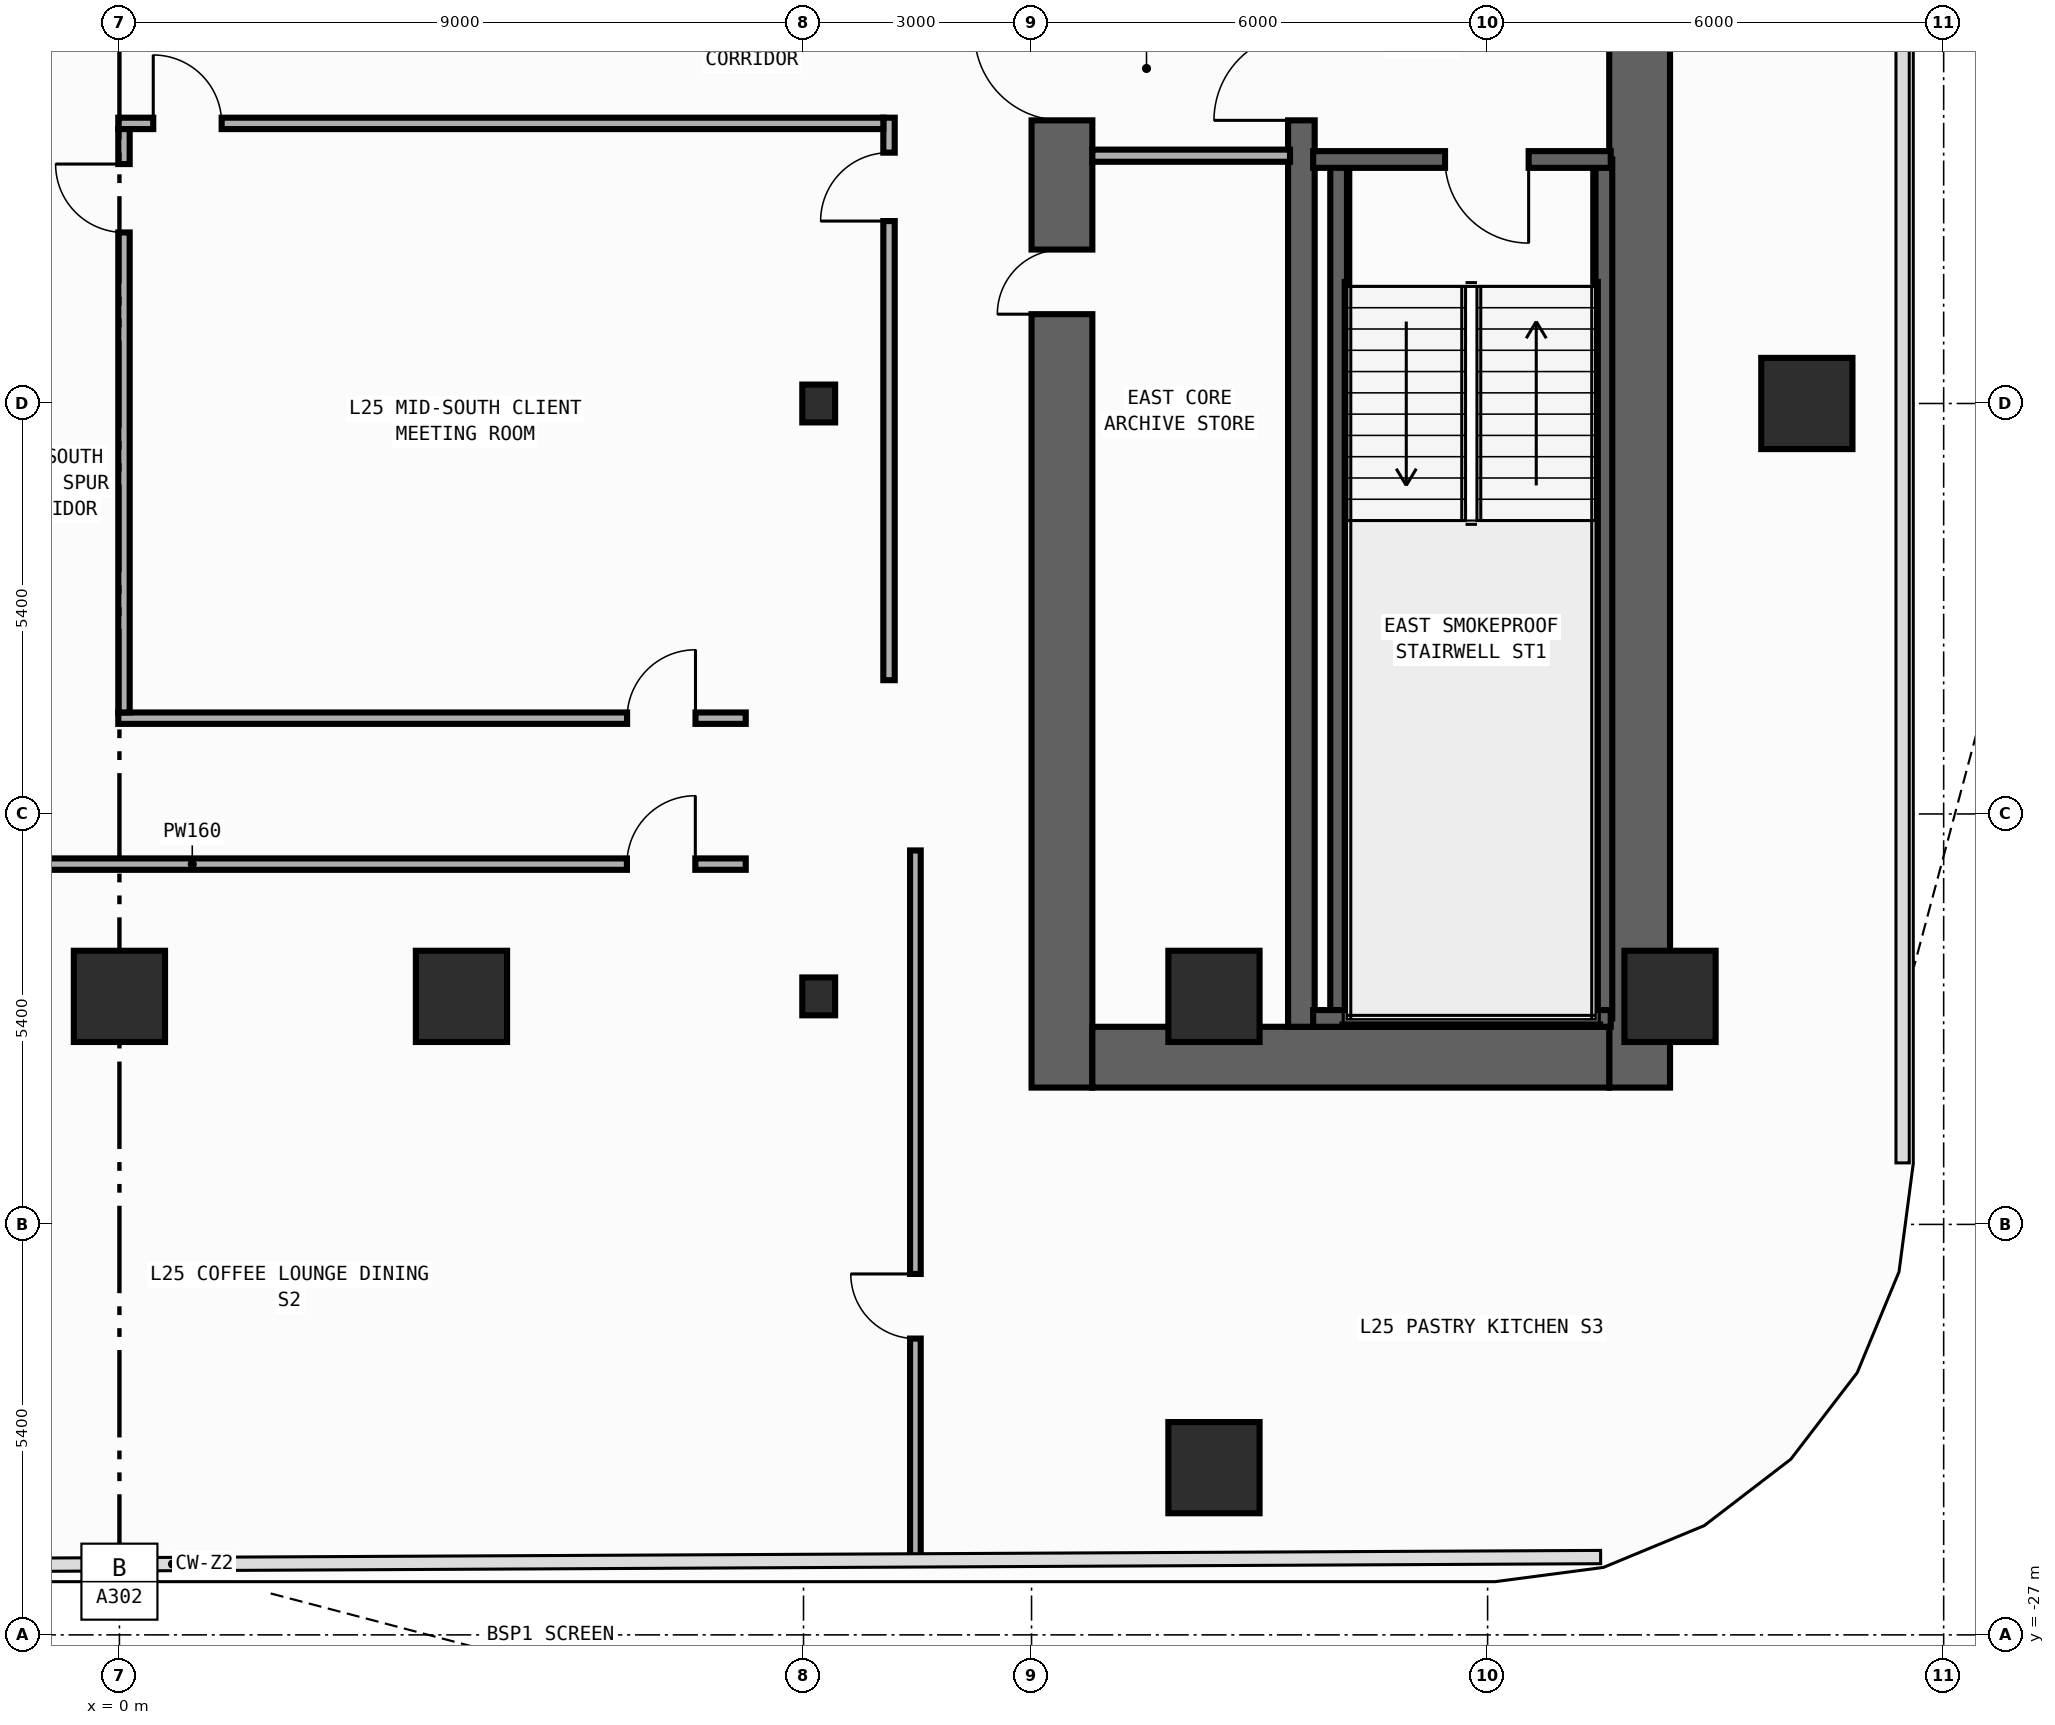
"""IFC4 building model, lengths in metres.
Left out: names, types, materials, properties, quantities, classifications, styles, units other than length and angle.
Written with IfcOpenShell. Run it as: python <this file> out.ifc"""

import sys

from ifc_helpers import new_model, si_unit, direction, frame, frame_2d, origin, origin_2d, place, context, subcontext, project, spatial, rectangle, i_section, extrude, element, fill, save


model = new_model("IFC4")
c1 = context("Model", 3, precision=1e-05, world=origin(), true_north=direction((0.0, 1.0)))
c2 = subcontext(c1, "Body", "Model", "MODEL_VIEW")
j1 = project(units=[si_unit("LENGTHUNIT", "METRE"), si_unit("PLANEANGLEUNIT", "RADIAN")], contexts=[c1])
p1 = place(None, origin())
s1 = spatial("IfcSite", under=j1, at=p1, CompositionType="ELEMENT")
p2 = place(p1, origin())
s2 = spatial("IfcBuilding", under=s1, at=p2, CompositionType="ELEMENT")
p3 = place(p2, frame((0.0, 0.0, 110.0)))
s3 = spatial("IfcBuildingStorey", under=s2, at=p3, CompositionType="ELEMENT", Elevation=110.0)
p4 = place(p3, frame((12.4, -19.8, 0.0), z_axis=(0.0, 0.0, 1.0), x_axis=(0.0, 1.0, 0.0)))
e1 = element("IfcWall", 1, at=p4, inside=s3, PredefinedType="SHEAR", context=c2, shape_type="SweptSolid", body=[
    extrude(rectangle(XDim=27.0, YDim=0.8, at=frame_2d((13.5, 0.0))), origin(), (0.0, 0.0, 1.0), 3.94),
])
p5 = place(p4, frame((23.05, 0.0, 0.0)))
e2 = element("IfcOpeningElement", 2, at=p5, cuts=e1, PredefinedType="OPENING", context=c2, shape_type="SweptSolid", body=[
    extrude(rectangle(XDim=1.1, YDim=2.2, at=frame_2d((0.55, 1.1))), frame((0.0, 0.41, 0.0), z_axis=(0.0, -1.0, 0.0), x_axis=(1.0, 0.0, 0.0)), (0.0, 0.0, 1.0), 0.82),
])
p6 = place(p4, frame((19.85, 0.0, 0.0)))
e3 = element("IfcOpeningElement", 3, at=p6, cuts=e1, PredefinedType="OPENING", context=c2, shape_type="SweptSolid", body=[
    extrude(rectangle(XDim=1.1, YDim=2.2, at=frame_2d((0.55, 1.1))), frame((0.0, 0.41, 0.0), z_axis=(0.0, -1.0, 0.0), x_axis=(1.0, 0.0, 0.0)), (0.0, 0.0, 1.0), 0.82),
])
p7 = place(p4, frame((16.65, 0.0, 0.0)))
e4 = element("IfcOpeningElement", 4, at=p7, cuts=e1, PredefinedType="OPENING", context=c2, shape_type="SweptSolid", body=[
    extrude(rectangle(XDim=1.1, YDim=2.2, at=frame_2d((0.55, 1.1))), frame((0.0, 0.41, 0.0), z_axis=(0.0, -1.0, 0.0), x_axis=(1.0, 0.0, 0.0)), (0.0, 0.0, 1.0), 0.82),
])
p8 = place(p4, frame((10.175, 0.0, 0.0)))
e5 = element("IfcOpeningElement", 5, at=p8, cuts=e1, PredefinedType="OPENING", context=c2, shape_type="SweptSolid", body=[
    extrude(rectangle(XDim=0.85, YDim=2.1, at=frame_2d((0.425, 1.05))), frame((0.0, 0.41, 0.0), z_axis=(0.0, -1.0, 0.0), x_axis=(1.0, 0.0, 0.0)), (0.0, 0.0, 1.0), 0.82),
])
p9 = place(p4, frame((12.725, 0.0, 0.0)))
e6 = element("IfcOpeningElement", 6, at=p9, cuts=e1, PredefinedType="OPENING", context=c2, shape_type="SweptSolid", body=[
    extrude(rectangle(XDim=1.15, YDim=2.2, at=frame_2d((0.575, 1.1))), frame((0.0, 0.41, 0.0), z_axis=(0.0, -1.0, 0.0), x_axis=(1.0, 0.0, 0.0)), (0.0, 0.0, 1.0), 0.82),
])
p10 = place(p4, frame((25.125, 0.0, 0.0)))
e7 = element("IfcOpeningElement", 7, at=p10, cuts=e1, PredefinedType="OPENING", context=c2, shape_type="SweptSolid", body=[
    extrude(rectangle(XDim=0.85, YDim=2.1, at=frame_2d((0.425, 1.05))), frame((0.0, 0.41, 0.0), z_axis=(0.0, -1.0, 0.0), x_axis=(1.0, 0.0, 0.0)), (0.0, 0.0, 1.0), 0.82),
])
p11 = place(p3, frame((20.0, -19.8, 0.0), z_axis=(0.0, 0.0, 1.0), x_axis=(0.0, 1.0, 0.0)))
e8 = element("IfcWall", 8, at=p11, inside=s3, PredefinedType="SHEAR", context=c2, shape_type="SweptSolid", body=[
    extrude(rectangle(XDim=27.0, YDim=0.8, at=frame_2d((13.5, 0.0))), origin(), (0.0, 0.0, 1.0), 3.94),
])
p12 = place(p3, frame((12.8, -19.4, 0.0), z_axis=(0.0, 0.0, 1.0), x_axis=(1.0, 0.0, 0.0)))
e9 = element("IfcWall", 9, at=p12, inside=s3, PredefinedType="SHEAR", context=c2, shape_type="SweptSolid", body=[
    extrude(rectangle(XDim=6.8, YDim=0.8, at=frame_2d((3.4, 0.0))), origin(), (0.0, 0.0, 1.0), 3.94),
])
p13 = place(p3, frame((15.55, -19.0, 0.0), z_axis=(0.0, 0.0, 1.0), x_axis=(0.0, 1.0, 0.0)))
e10 = element("IfcWall", 10, at=p13, inside=s3, PredefinedType="SHEAR", context=c2, shape_type="SweptSolid", body=[
    extrude(rectangle(XDim=25.4, YDim=0.35, at=frame_2d((12.7, 0.0))), origin(), (0.0, 0.0, 1.0), 3.94),
])
p14 = place(p13, frame((11.925, 0.0, 0.0)))
e11 = element("IfcOpeningElement", 11, at=p14, cuts=e10, PredefinedType="OPENING", context=c2, shape_type="SweptSolid", body=[
    extrude(rectangle(XDim=1.15, YDim=2.2, at=frame_2d((0.575, 1.1))), frame((0.0, 0.185, 0.0), z_axis=(0.0, -1.0, 0.0), x_axis=(1.0, 0.0, 0.0)), (0.0, 0.0, 1.0), 0.37),
])
p15 = place(p13, frame((24.325, 0.0, 0.0)))
e12 = element("IfcOpeningElement", 12, at=p15, cuts=e10, PredefinedType="OPENING", context=c2, shape_type="SweptSolid", body=[
    extrude(rectangle(XDim=0.85, YDim=2.1, at=frame_2d((0.425, 1.05))), frame((0.0, 0.185, 0.0), z_axis=(0.0, -1.0, 0.0), x_axis=(1.0, 0.0, 0.0)), (0.0, 0.0, 1.0), 0.37),
])
for number, where, z_axis, x_axis in (
    (13, (16.04, -18.89, 0.0), (0.0, 0.0, 1.0), (0.0, 1.0, 0.0)),
    (14, (19.53, -18.89, 0.0), (0.0, 0.0, 1.0), (0.0, 1.0, 0.0)),
):
    element("IfcWall", number, at=place(p3, frame(where, z_axis=z_axis, x_axis=x_axis)), inside=s3, PredefinedType="SHEAR", context=c2, shape_type="SweptSolid", body=[
        extrude(rectangle(XDim=11.3, YDim=0.22, at=frame_2d((5.65, 0.0))), origin(), (0.0, 0.0, 1.0), 3.94),
    ])
p16 = place(p3, frame((15.705, -18.89, 0.0), z_axis=(0.0, 0.0, 1.0), x_axis=(1.0, 0.0, 0.0)))
e15 = element("IfcWall", 15, at=p16, inside=s3, PredefinedType="SHEAR", context=c2, shape_type="SweptSolid", body=[
    extrude(rectangle(XDim=3.915, YDim=0.22, at=frame_2d((1.958, 0.0))), origin(), (0.0, 0.0, 1.0), 3.94),
])
p17 = place(p3, frame((19.62, -7.59, 0.0), z_axis=(0.0, 0.0, 1.0), x_axis=(-1.0, 0.0, 0.0)))
e16 = element("IfcWall", 16, at=p17, inside=s3, PredefinedType="SHEAR", context=c2, shape_type="SweptSolid", body=[
    extrude(rectangle(XDim=3.915, YDim=0.22, at=frame_2d((1.958, 0.0))), origin(), (0.0, 0.0, 1.0), 3.94),
])
p18 = place(p17, frame((1.08, 0.0, 0.0)))
e17 = element("IfcOpeningElement", 17, at=p18, cuts=e16, PredefinedType="OPENING", context=c2, shape_type="SweptSolid", body=[
    extrude(rectangle(XDim=1.1, YDim=2.2, at=frame_2d((0.55, 1.1))), frame((0.0, 0.12, 0.0), z_axis=(0.0, -1.0, 0.0), x_axis=(1.0, 0.0, 0.0)), (0.0, 0.0, 1.0), 0.24),
])
for number, where, z_axis, x_axis in (
    (18, (9.2, -18.6, 0.0), (0.0, 0.0, 1.0), (1.0, 0.0, 0.0)),
    (19, (9.2, -10.8, 0.0), (0.0, 0.0, 1.0), (1.0, 0.0, 0.0)),
):
    element("IfcColumn", number, at=place(p3, frame(where, z_axis=z_axis, x_axis=x_axis)), inside=s3, PredefinedType="COLUMN", context=c2, shape_type="SweptSolid", body=[
        extrude(i_section(OverallWidth=0.432, OverallDepth=0.498, WebThickness=0.045, FlangeThickness=0.07, FilletRadius=0.022, at=origin_2d()), origin(), (0.0, 0.0, 1.0), 4.2),
    ])
for number, where, z_axis, x_axis in (
    (20, (20.4, -18.6, 0.0), (0.0, 0.0, 1.0), (1.0, 0.0, 0.0)),
    (21, (14.4, -18.6, 0.0), (0.0, 0.0, 1.0), (1.0, 0.0, 0.0)),
    (22, (0.0, -18.6, 0.0), (0.0, 0.0, 1.0), (1.0, 0.0, 0.0)),
    (23, (4.5, -18.6, 0.0), (0.0, 0.0, 1.0), (1.0, 0.0, 0.0)),
    (24, (22.2, -10.8, 0.0), (0.0, 0.0, 1.0), (1.0, 0.0, 0.0)),
    (25, (14.4, -24.8, 0.0), (0.0, 0.0, 1.0), (1.0, 0.0, 0.0)),
):
    element("IfcColumn", number, at=place(p3, frame(where, z_axis=z_axis, x_axis=x_axis)), inside=s3, PredefinedType="COLUMN", context=c2, shape_type="SweptSolid", body=[
        extrude(rectangle(XDim=1.2, YDim=1.2, at=origin_2d()), origin(), (0.0, 0.0, 1.0), 4.2),
    ])
p19 = place(p3, frame((12.8, -7.54, 0.0), z_axis=(0.0, 0.0, 1.0), x_axis=(1.0, 0.0, 0.0)))
e26 = element("IfcWall", 26, at=p19, inside=s3, PredefinedType="STANDARD", context=c2, shape_type="SweptSolid", body=[
    extrude(rectangle(XDim=2.6, YDim=0.16, at=frame_2d((1.3, 0.0))), origin(), (0.0, 0.0, 1.0), 3.94),
])
p20 = place(p3, frame((10.125, -14.44, 0.0), z_axis=(0.0, 0.0, 1.0), x_axis=(0.0, 1.0, 0.0)))
e27 = element("IfcWall", 27, at=p20, inside=s3, PredefinedType="PARTITIONING", context=c2, shape_type="SweptSolid", body=[
    extrude(rectangle(XDim=7.4, YDim=0.15, at=frame_2d((3.7, 0.0))), origin(), (0.0, 0.0, 1.0), 3.94),
])
p21 = place(p20, frame((6.04, 0.0, 0.0)))
e28 = element("IfcOpeningElement", 28, at=p21, cuts=e27, PredefinedType="OPENING", context=c2, shape_type="SweptSolid", body=[
    extrude(rectangle(XDim=0.9, YDim=2.15, at=frame_2d((0.45, 1.075))), frame((0.0, 0.085, 0.0), z_axis=(0.0, -1.0, 0.0), x_axis=(1.0, 0.0, 0.0)), (0.0, 0.0, 1.0), 0.17),
])
p22 = place(p3, frame((-0.015, -7.115, 0.0), z_axis=(0.0, 0.0, 1.0), x_axis=(1.0, 0.0, 0.0)))
e29 = element("IfcWall", 29, at=p22, inside=s3, PredefinedType="PARTITIONING", context=c2, shape_type="SweptSolid", body=[
    extrude(rectangle(XDim=10.065, YDim=0.15, at=frame_2d((5.032, 0.0))), origin(), (0.0, 0.0, 1.0), 3.94),
])
p23 = place(p22, frame((0.46, 0.0, 0.0)))
e30 = element("IfcOpeningElement", 30, at=p23, cuts=e29, PredefinedType="OPENING", context=c2, shape_type="SweptSolid", body=[
    extrude(rectangle(XDim=0.9, YDim=2.15, at=frame_2d((0.45, 1.075))), frame((0.0, 0.085, 0.0), z_axis=(0.0, -1.0, 0.0), x_axis=(1.0, 0.0, 0.0)), (0.0, 0.0, 1.0), 0.17),
])
p24 = place(p3, frame((-4.76, -16.86, 0.0), z_axis=(0.0, 0.0, 1.0), x_axis=(1.0, 0.0, 0.0)))
e31 = element("IfcWall", 31, at=p24, inside=s3, PredefinedType="PARTITIONING", context=c2, shape_type="SweptSolid", body=[
    extrude(rectangle(XDim=13.0, YDim=0.15, at=frame_2d((6.5, 0.0))), origin(), (0.0, 0.0, 1.0), 3.94),
])
p25 = place(p24, frame((11.437, 0.0, 0.0)))
e32 = element("IfcOpeningElement", 32, at=p25, cuts=e31, PredefinedType="OPENING", context=c2, shape_type="SweptSolid", body=[
    extrude(rectangle(XDim=0.9, YDim=2.15, at=frame_2d((0.45, 1.075))), frame((0.0, 0.085, 0.0), z_axis=(0.0, -1.0, 0.0), x_axis=(1.0, 0.0, 0.0)), (0.0, 0.0, 1.0), 0.17),
])
p26 = place(p3, frame((-0.015, -14.94, 0.0), z_axis=(0.0, 0.0, 1.0), x_axis=(1.0, 0.0, 0.0)))
e33 = element("IfcWall", 33, at=p26, inside=s3, PredefinedType="PARTITIONING", context=c2, shape_type="SweptSolid", body=[
    extrude(rectangle(XDim=8.255, YDim=0.15, at=frame_2d((4.127, 0.0))), origin(), (0.0, 0.0, 1.0), 3.94),
])
p27 = place(p26, frame((6.694, 0.0, 0.0)))
e34 = element("IfcOpeningElement", 34, at=p27, cuts=e33, PredefinedType="OPENING", context=c2, shape_type="SweptSolid", body=[
    extrude(rectangle(XDim=0.9, YDim=2.15, at=frame_2d((0.45, 1.075))), frame((0.0, 0.085, 0.0), z_axis=(0.0, -1.0, 0.0), x_axis=(1.0, 0.0, 0.0)), (0.0, 0.0, 1.0), 0.17),
])
p28 = place(p3, frame((0.06, -14.865, 0.0), z_axis=(0.0, 0.0, 1.0), x_axis=(0.0, 1.0, 0.0)))
e35 = element("IfcWall", 35, at=p28, inside=s3, PredefinedType="PARTITIONING", context=c2, shape_type="SweptSolid", body=[
    extrude(rectangle(XDim=7.675, YDim=0.15, at=frame_2d((3.837, 0.0))), origin(), (0.0, 0.0, 1.0), 3.94),
])
p29 = place(p28, frame((6.315, 0.0, 0.0)))
e36 = element("IfcOpeningElement", 36, at=p29, cuts=e35, PredefinedType="OPENING", context=c2, shape_type="SweptSolid", body=[
    extrude(rectangle(XDim=0.9, YDim=2.15, at=frame_2d((0.45, 1.075))), frame((0.0, 0.085, 0.0), z_axis=(0.0, -1.0, 0.0), x_axis=(1.0, 0.0, 0.0)), (0.0, 0.0, 1.0), 0.17),
])
p30 = place(p3, frame((10.472, -26.015, 0.0), z_axis=(0.0, 0.0, 1.0), x_axis=(0.0, 1.0, 0.0)))
e37 = element("IfcWall", 37, at=p30, inside=s3, PredefinedType="PARTITIONING", context=c2, shape_type="SweptSolid", body=[
    extrude(rectangle(XDim=9.335, YDim=0.14, at=frame_2d((4.668, 0.0))), origin(), (0.0, 0.0, 1.0), 3.94),
])
p31 = place(p30, frame((2.914, 0.0, 0.0)))
e38 = element("IfcOpeningElement", 38, at=p31, cuts=e37, PredefinedType="OPENING", context=c2, shape_type="SweptSolid", body=[
    extrude(rectangle(XDim=0.85, YDim=2.1, at=frame_2d((0.425, 1.05))), frame((0.0, 0.08, 0.0), z_axis=(0.0, -1.0, 0.0), x_axis=(1.0, 0.0, 0.0)), (0.0, 0.0, 1.0), 0.16),
])
p32 = place(p18, origin())
e39 = element("IfcDoor", 39, at=p32, inside=s3, OperationType="SINGLE_SWING_LEFT", PredefinedType="DOOR", context=c2, shape_type="SweptSolid", body=[
    extrude(rectangle(XDim=1.1, YDim=2.2, at=frame_2d((0.55, 1.1))), frame((0.0, 0.025, 0.0), z_axis=(0.0, -1.0, 0.0), x_axis=(1.0, 0.0, 0.0)), (0.0, 0.0, 1.0), 0.05),
])
fill(e17, e39)
p33 = place(p8, origin())
e40 = element("IfcDoor", 40, at=p33, inside=s3, OperationType="SINGLE_SWING_LEFT", PredefinedType="DOOR", context=c2, shape_type="SweptSolid", body=[
    extrude(rectangle(XDim=0.85, YDim=2.1, at=frame_2d((0.425, 1.05))), frame((0.0, 0.025, 0.0), z_axis=(0.0, -1.0, 0.0), x_axis=(1.0, 0.0, 0.0)), (0.0, 0.0, 1.0), 0.05),
])
fill(e5, e40)
p34 = place(p9, origin())
e41 = element("IfcDoor", 41, at=p34, inside=s3, OperationType="SINGLE_SWING_RIGHT", PredefinedType="DOOR", context=c2, shape_type="SweptSolid", body=[
    extrude(rectangle(XDim=1.15, YDim=2.2, at=frame_2d((0.575, 1.1))), frame((0.0, 0.025, 0.0), z_axis=(0.0, -1.0, 0.0), x_axis=(1.0, 0.0, 0.0)), (0.0, 0.0, 1.0), 0.05),
])
fill(e6, e41)
p35 = place(p14, origin())
e42 = element("IfcDoor", 42, at=p35, inside=s3, OperationType="SINGLE_SWING_LEFT", PredefinedType="DOOR", context=c2, shape_type="SweptSolid", body=[
    extrude(rectangle(XDim=1.15, YDim=2.2, at=frame_2d((0.575, 1.1))), frame((0.0, 0.025, 0.0), z_axis=(0.0, -1.0, 0.0), x_axis=(1.0, 0.0, 0.0)), (0.0, 0.0, 1.0), 0.05),
])
fill(e11, e42)
p36 = place(p21, origin())
e43 = element("IfcDoor", 43, at=p36, inside=s3, OperationType="SINGLE_SWING_LEFT", PredefinedType="DOOR", context=c2, shape_type="SweptSolid", body=[
    extrude(rectangle(XDim=0.9, YDim=2.15, at=frame_2d((0.45, 1.075))), frame((0.0, 0.025, 0.0), z_axis=(0.0, -1.0, 0.0), x_axis=(1.0, 0.0, 0.0)), (0.0, 0.0, 1.0), 0.05),
])
fill(e28, e43)
p37 = place(p23, origin())
e44 = element("IfcDoor", 44, at=p37, inside=s3, OperationType="SINGLE_SWING_LEFT", PredefinedType="DOOR", context=c2, shape_type="SweptSolid", body=[
    extrude(rectangle(XDim=0.9, YDim=2.15, at=frame_2d((0.45, 1.075))), frame((0.0, 0.025, 0.0), z_axis=(0.0, -1.0, 0.0), x_axis=(1.0, 0.0, 0.0)), (0.0, 0.0, 1.0), 0.05),
])
fill(e30, e44)
p38 = place(p25, origin())
e45 = element("IfcDoor", 45, at=p38, inside=s3, OperationType="SINGLE_SWING_RIGHT", PredefinedType="DOOR", context=c2, shape_type="SweptSolid", body=[
    extrude(rectangle(XDim=0.9, YDim=2.15, at=frame_2d((0.45, 1.075))), frame((0.0, 0.025, 0.0), z_axis=(0.0, -1.0, 0.0), x_axis=(1.0, 0.0, 0.0)), (0.0, 0.0, 1.0), 0.05),
])
fill(e32, e45)
p39 = place(p27, origin())
e46 = element("IfcDoor", 46, at=p39, inside=s3, OperationType="SINGLE_SWING_RIGHT", PredefinedType="DOOR", context=c2, shape_type="SweptSolid", body=[
    extrude(rectangle(XDim=0.9, YDim=2.15, at=frame_2d((0.45, 1.075))), frame((0.0, 0.025, 0.0), z_axis=(0.0, -1.0, 0.0), x_axis=(1.0, 0.0, 0.0)), (0.0, 0.0, 1.0), 0.05),
])
fill(e34, e46)
p40 = place(p29, origin())
e47 = element("IfcDoor", 47, at=p40, inside=s3, OperationType="SINGLE_SWING_RIGHT", PredefinedType="DOOR", context=c2, shape_type="SweptSolid", body=[
    extrude(rectangle(XDim=0.9, YDim=2.15, at=frame_2d((0.45, 1.075))), frame((0.0, 0.025, 0.0), z_axis=(0.0, -1.0, 0.0), x_axis=(1.0, 0.0, 0.0)), (0.0, 0.0, 1.0), 0.05),
])
fill(e36, e47)
p41 = place(p31, origin())
e48 = element("IfcDoor", 48, at=p41, inside=s3, OperationType="SINGLE_SWING_RIGHT", PredefinedType="DOOR", context=c2, shape_type="SweptSolid", body=[
    extrude(rectangle(XDim=0.85, YDim=2.1, at=frame_2d((0.425, 1.05))), frame((0.0, 0.025, 0.0), z_axis=(0.0, -1.0, 0.0), x_axis=(1.0, 0.0, 0.0)), (0.0, 0.0, 1.0), 0.05),
])
fill(e38, e48)
save(model, sys.argv[1])
